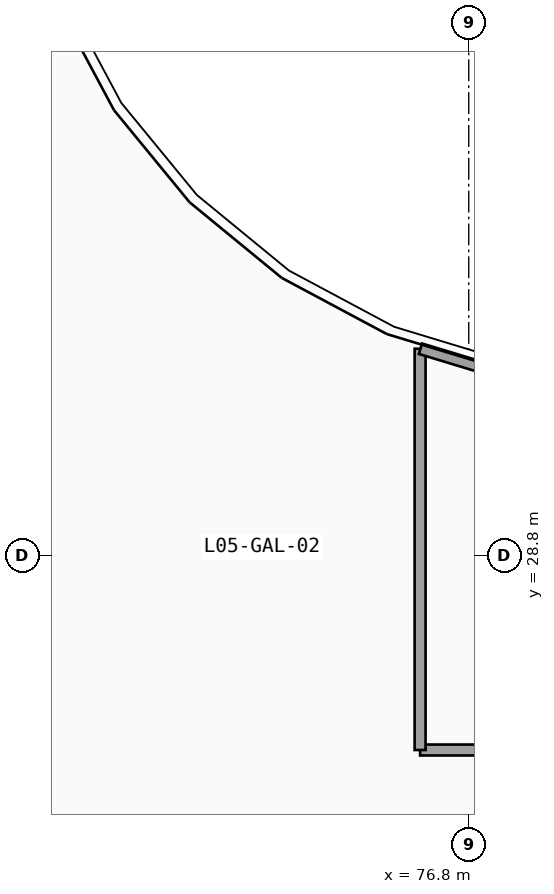
"""IFC4 building model, lengths in metres.
Left out: names, types, materials, properties, quantities, classifications, styles, units other than length and angle.
Written with IfcOpenShell. Run it as: python <this file> out.ifc"""

import sys

from ifc_helpers import new_model, si_unit, direction, frame, frame_2d, origin, place, context, subcontext, project, spatial, rectangle, extrude, element, save


model = new_model("IFC4")
c1 = context("Model", 3, precision=1e-05, world=origin(), true_north=direction((0.0, 1.0)))
c2 = subcontext(c1, "Body", "Model", "MODEL_VIEW")
j1 = project(units=[si_unit("LENGTHUNIT", "METRE"), si_unit("PLANEANGLEUNIT", "RADIAN")], contexts=[c1])
p1 = place(None, origin())
s1 = spatial("IfcSite", under=j1, at=p1, CompositionType="ELEMENT")
p2 = place(p1, origin())
s2 = spatial("IfcBuilding", under=s1, at=p2, CompositionType="ELEMENT")
p3 = place(p2, frame((0.0, 0.0, 23.1)))
s3 = spatial("IfcBuildingStorey", under=s2, at=p3, CompositionType="ELEMENT", Elevation=23.1)
p4 = place(p3, frame((78.35, 25.6, 0.0), z_axis=(0.0, 0.0, 1.0), x_axis=(-1.0, 0.0, 0.0)))
e1 = element("IfcWall", 1, at=p4, inside=s3, PredefinedType="PARTITIONING", context=c2, shape_type="SweptSolid", body=[
    extrude(rectangle(XDim=2.35, YDim=0.18, at=frame_2d((1.175, 0.0))), origin(), (0.0, 0.0, 1.0), 4.82),
])
p5 = place(p3, frame((76.0, 25.6, 0.0), z_axis=(0.0, 0.0, 1.0), x_axis=(0.0, 1.0, 0.0)))
e2 = element("IfcWall", 2, at=p5, inside=s3, PredefinedType="PARTITIONING", context=c2, shape_type="SweptSolid", body=[
    extrude(rectangle(XDim=6.6, YDim=0.18, at=frame_2d((3.3, 0.0))), origin(), (0.0, 0.0, 1.0), 4.82),
])
p6 = place(p3, frame((76.006, 32.2, 0.0), z_axis=(0.0, 0.0, 1.0), x_axis=(0.956921766266, -0.290345885534, 0.0)))
e3 = element("IfcWall", 3, at=p6, inside=s3, PredefinedType="PARTITIONING", context=c2, shape_type="SweptSolid", body=[
    extrude(rectangle(XDim=1.441, YDim=0.18, at=frame_2d((0.721, 0.0))), origin(), (0.0, 0.0, 1.0), 4.82),
])
save(model, sys.argv[1])
